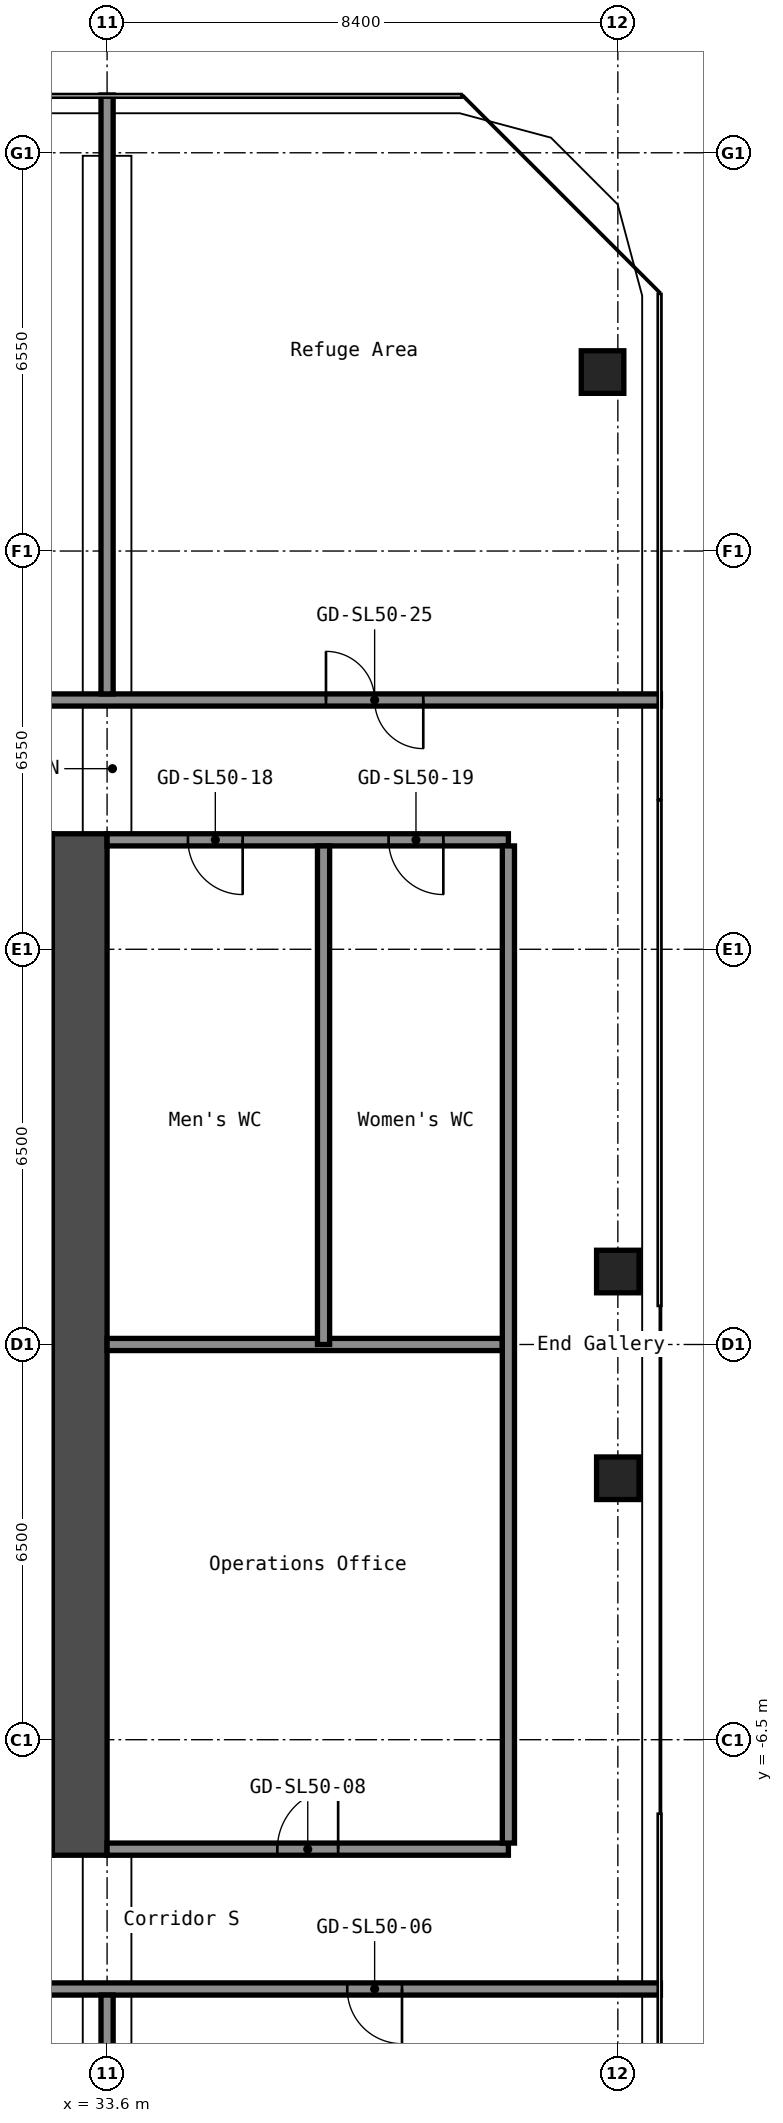
"""IFC4 building model, lengths in metres.
Left out: names, types, materials, properties, quantities, classifications, styles, units other than length and angle.
Written with IfcOpenShell. Run it as: python <this file> out.ifc"""

import sys

from ifc_helpers import new_model, si_unit, direction, frame, frame_2d, origin, origin_2d, place, context, subcontext, project, spatial, rectangle, hollow_rectangle, extrude, element, fill, save


model = new_model("IFC4")
c1 = context("Model", 3, precision=1e-05, world=origin(), true_north=direction((0.0, 1.0)))
c2 = subcontext(c1, "Body", "Model", "MODEL_VIEW")
j1 = project(units=[si_unit("LENGTHUNIT", "METRE"), si_unit("PLANEANGLEUNIT", "RADIAN")], contexts=[c1])
p1 = place(None, origin())
s1 = spatial("IfcSite", under=j1, at=p1, CompositionType="ELEMENT")
p2 = place(p1, origin())
s2 = spatial("IfcBuilding", under=s1, at=p2, CompositionType="ELEMENT")
p3 = place(p2, frame((0.0, 0.0, 175.8)))
s3 = spatial("IfcBuildingStorey", under=s2, at=p3, CompositionType="ELEMENT", Elevation=175.8)
for number, where, z_axis, x_axis in (
    (1, (42.0, -2.2, 0.0), (0.0, 0.0, 1.0), (1.0, 0.0, 0.0)),
    (2, (42.0, 1.2, 0.0), (0.0, 0.0, 1.0), (1.0, 0.0, 0.0)),
    (3, (41.749, 15.994, 0.0), (0.0, 0.0, 1.0), (1.0, 0.0, 0.0)),
):
    element("IfcColumn", number, at=place(p3, frame(where, z_axis=z_axis, x_axis=x_axis)), inside=s3, PredefinedType="COLUMN", context=c2, shape_type="SweptSolid", body=[
        extrude(hollow_rectangle(XDim=0.7, YDim=0.7, WallThickness=0.028, at=origin_2d()), origin(), (0.0, 0.0, 1.0), 4.1),
    ])
p4 = place(p3, frame((33.15, -8.4, 0.0), z_axis=(0.0, 0.0, 1.0), x_axis=(0.0, 1.0, 0.0)))
e4 = element("IfcWall", 4, at=p4, inside=s3, PredefinedType="SHEAR", context=c2, shape_type="SweptSolid", body=[
    extrude(rectangle(XDim=16.8, YDim=0.9, at=frame_2d((8.4, 0.0))), origin(), (0.0, 0.0, 1.0), 4.1),
])
p5 = place(p3, frame((16.8, -10.6, 0.0), z_axis=(0.0, 0.0, 1.0), x_axis=(1.0, 0.0, 0.0)))
e5 = element("IfcWall", 5, at=p5, inside=s3, PredefinedType="PARTITIONING", context=c2, shape_type="SweptSolid", body=[
    extrude(rectangle(XDim=25.9, YDim=0.2, at=frame_2d((12.95, 0.0))), origin(), (0.0, 0.0, 1.0), 4.1),
])
p6 = place(p5, frame((3.75, 0.0, 0.0)))
e6 = element("IfcOpeningElement", 6, at=p6, cuts=e5, PredefinedType="OPENING", context=c2, shape_type="SweptSolid", body=[
    extrude(rectangle(XDim=0.9, YDim=2.1, at=frame_2d((0.45, 1.05))), frame((0.0, 0.11, 0.0), z_axis=(0.0, -1.0, 0.0), x_axis=(1.0, 0.0, 0.0)), (0.0, 0.0, 1.0), 0.22),
])
p7 = place(p5, frame((11.8, 0.0, 0.0)))
e7 = element("IfcOpeningElement", 7, at=p7, cuts=e5, PredefinedType="OPENING", context=c2, shape_type="SweptSolid", body=[
    extrude(rectangle(XDim=1.6, YDim=2.1, at=frame_2d((0.8, 1.05))), frame((0.0, 0.11, 0.0), z_axis=(0.0, -1.0, 0.0), x_axis=(1.0, 0.0, 0.0)), (0.0, 0.0, 1.0), 0.22),
])
p8 = place(p5, frame((20.75, 0.0, 0.0)))
e8 = element("IfcOpeningElement", 8, at=p8, cuts=e5, PredefinedType="OPENING", context=c2, shape_type="SweptSolid", body=[
    extrude(rectangle(XDim=0.9, YDim=2.1, at=frame_2d((0.45, 1.05))), frame((0.0, 0.11, 0.0), z_axis=(0.0, -1.0, 0.0), x_axis=(1.0, 0.0, 0.0)), (0.0, 0.0, 1.0), 0.22),
])
p9 = place(p3, frame((33.6, -8.3, 0.0), z_axis=(0.0, 0.0, 1.0), x_axis=(1.0, 0.0, 0.0)))
e9 = element("IfcWall", 9, at=p9, inside=s3, PredefinedType="PARTITIONING", context=c2, shape_type="SweptSolid", body=[
    extrude(rectangle(XDim=6.6, YDim=0.2, at=frame_2d((3.3, 0.0))), origin(), (0.0, 0.0, 1.0), 4.1),
])
p10 = place(p9, frame((2.8, 0.0, 0.0)))
e10 = element("IfcOpeningElement", 10, at=p10, cuts=e9, PredefinedType="OPENING", context=c2, shape_type="SweptSolid", body=[
    extrude(rectangle(XDim=1.0, YDim=2.1, at=frame_2d((0.5, 1.05))), frame((0.0, 0.11, 0.0), z_axis=(0.0, -1.0, 0.0), x_axis=(1.0, 0.0, 0.0)), (0.0, 0.0, 1.0), 0.22),
])
p11 = place(p3, frame((33.6, 0.0, 0.0), z_axis=(0.0, 0.0, 1.0), x_axis=(1.0, 0.0, 0.0)))
e11 = element("IfcWall", 11, at=p11, inside=s3, PredefinedType="PARTITIONING", context=c2, shape_type="SweptSolid", body=[
    extrude(rectangle(XDim=6.5, YDim=0.2, at=frame_2d((3.25, 0.0))), origin(), (0.0, 0.0, 1.0), 4.1),
])
p12 = place(p3, frame((33.6, 8.3, 0.0), z_axis=(0.0, 0.0, 1.0), x_axis=(1.0, 0.0, 0.0)))
e12 = element("IfcWall", 12, at=p12, inside=s3, PredefinedType="PARTITIONING", context=c2, shape_type="SweptSolid", body=[
    extrude(rectangle(XDim=6.6, YDim=0.2, at=frame_2d((3.3, 0.0))), origin(), (0.0, 0.0, 1.0), 4.1),
])
p13 = place(p12, frame((1.33, 0.0, 0.0)))
e13 = element("IfcOpeningElement", 13, at=p13, cuts=e12, PredefinedType="OPENING", context=c2, shape_type="SweptSolid", body=[
    extrude(rectangle(XDim=0.9, YDim=2.1, at=frame_2d((0.45, 1.05))), frame((0.0, 0.11, 0.0), z_axis=(0.0, -1.0, 0.0), x_axis=(1.0, 0.0, 0.0)), (0.0, 0.0, 1.0), 0.22),
])
p14 = place(p12, frame((4.63, 0.0, 0.0)))
e14 = element("IfcOpeningElement", 14, at=p14, cuts=e12, PredefinedType="OPENING", context=c2, shape_type="SweptSolid", body=[
    extrude(rectangle(XDim=0.9, YDim=2.1, at=frame_2d((0.45, 1.05))), frame((0.0, 0.11, 0.0), z_axis=(0.0, -1.0, 0.0), x_axis=(1.0, 0.0, 0.0)), (0.0, 0.0, 1.0), 0.22),
])
p15 = place(p3, frame((16.8, 10.6, 0.0), z_axis=(0.0, 0.0, 1.0), x_axis=(1.0, 0.0, 0.0)))
e15 = element("IfcWall", 15, at=p15, inside=s3, PredefinedType="PARTITIONING", context=c2, shape_type="SweptSolid", body=[
    extrude(rectangle(XDim=25.9, YDim=0.2, at=frame_2d((12.95, 0.0))), origin(), (0.0, 0.0, 1.0), 4.1),
])
p16 = place(p15, frame((3.4, 0.0, 0.0)))
e16 = element("IfcOpeningElement", 16, at=p16, cuts=e15, PredefinedType="OPENING", context=c2, shape_type="SweptSolid", body=[
    extrude(rectangle(XDim=1.6, YDim=2.1, at=frame_2d((0.8, 1.05))), frame((0.0, 0.11, 0.0), z_axis=(0.0, -1.0, 0.0), x_axis=(1.0, 0.0, 0.0)), (0.0, 0.0, 1.0), 0.22),
])
p17 = place(p15, frame((12.15, 0.0, 0.0)))
e17 = element("IfcOpeningElement", 17, at=p17, cuts=e15, PredefinedType="OPENING", context=c2, shape_type="SweptSolid", body=[
    extrude(rectangle(XDim=0.9, YDim=2.1, at=frame_2d((0.45, 1.05))), frame((0.0, 0.11, 0.0), z_axis=(0.0, -1.0, 0.0), x_axis=(1.0, 0.0, 0.0)), (0.0, 0.0, 1.0), 0.22),
])
p18 = place(p15, frame((20.4, 0.0, 0.0)))
e18 = element("IfcOpeningElement", 18, at=p18, cuts=e15, PredefinedType="OPENING", context=c2, shape_type="SweptSolid", body=[
    extrude(rectangle(XDim=1.6, YDim=2.1, at=frame_2d((0.8, 1.05))), frame((0.0, 0.11, 0.0), z_axis=(0.0, -1.0, 0.0), x_axis=(1.0, 0.0, 0.0)), (0.0, 0.0, 1.0), 0.22),
])
p19 = place(p3, frame((33.6, -19.3, 0.0), z_axis=(0.0, 0.0, 1.0), x_axis=(0.0, 1.0, 0.0)))
e19 = element("IfcWall", 19, at=p19, inside=s3, PredefinedType="PARTITIONING", context=c2, shape_type="SweptSolid", body=[
    extrude(rectangle(XDim=8.6, YDim=0.2, at=frame_2d((4.3, 0.0))), origin(), (0.0, 0.0, 1.0), 4.1),
])
p20 = place(p3, frame((33.6, 10.7, 0.0), z_axis=(0.0, 0.0, 1.0), x_axis=(0.0, 1.0, 0.0)))
e20 = element("IfcWall", 20, at=p20, inside=s3, PredefinedType="PARTITIONING", context=c2, shape_type="SweptSolid", body=[
    extrude(rectangle(XDim=9.85, YDim=0.2, at=frame_2d((4.925, 0.0))), origin(), (0.0, 0.0, 1.0), 4.1),
])
p21 = place(p3, frame((37.16, 0.0, 0.0), z_axis=(0.0, 0.0, 1.0), x_axis=(0.0, 1.0, 0.0)))
e21 = element("IfcWall", 21, at=p21, inside=s3, PredefinedType="PARTITIONING", context=c2, shape_type="SweptSolid", body=[
    extrude(rectangle(XDim=8.2, YDim=0.2, at=frame_2d((4.1, 0.0))), origin(), (0.0, 0.0, 1.0), 4.1),
])
p22 = place(p3, frame((40.2, -8.2, 0.0), z_axis=(0.0, 0.0, 1.0), x_axis=(0.0, 1.0, 0.0)))
e22 = element("IfcWall", 22, at=p22, inside=s3, PredefinedType="PARTITIONING", context=c2, shape_type="SweptSolid", body=[
    extrude(rectangle(XDim=16.4, YDim=0.2, at=frame_2d((8.2, 0.0))), origin(), (0.0, 0.0, 1.0), 4.1),
])
p23 = place(p8, origin())
e23 = element("IfcDoor", 23, at=p23, inside=s3, OperationType="SINGLE_SWING_RIGHT", PredefinedType="DOOR", context=c2, shape_type="SweptSolid", body=[
    extrude(rectangle(XDim=0.9, YDim=2.1, at=frame_2d((0.45, 1.05))), frame((0.0, 0.025, 0.0), z_axis=(0.0, -1.0, 0.0), x_axis=(1.0, 0.0, 0.0)), (0.0, 0.0, 1.0), 0.05),
])
fill(e8, e23)
p24 = place(p10, origin())
e24 = element("IfcDoor", 24, at=p24, inside=s3, OperationType="SINGLE_SWING_LEFT", PredefinedType="DOOR", context=c2, shape_type="SweptSolid", body=[
    extrude(rectangle(XDim=1.0, YDim=2.1, at=frame_2d((0.5, 1.05))), frame((0.0, 0.025, 0.0), z_axis=(0.0, -1.0, 0.0), x_axis=(1.0, 0.0, 0.0)), (0.0, 0.0, 1.0), 0.05),
])
fill(e10, e24)
p25 = place(p13, origin())
e25 = element("IfcDoor", 25, at=p25, inside=s3, OperationType="SINGLE_SWING_RIGHT", PredefinedType="DOOR", context=c2, shape_type="SweptSolid", body=[
    extrude(rectangle(XDim=0.9, YDim=2.1, at=frame_2d((0.45, 1.05))), frame((0.0, 0.025, 0.0), z_axis=(0.0, -1.0, 0.0), x_axis=(1.0, 0.0, 0.0)), (0.0, 0.0, 1.0), 0.05),
])
fill(e13, e25)
p26 = place(p14, origin())
e26 = element("IfcDoor", 26, at=p26, inside=s3, OperationType="SINGLE_SWING_RIGHT", PredefinedType="DOOR", context=c2, shape_type="SweptSolid", body=[
    extrude(rectangle(XDim=0.9, YDim=2.1, at=frame_2d((0.45, 1.05))), frame((0.0, 0.025, 0.0), z_axis=(0.0, -1.0, 0.0), x_axis=(1.0, 0.0, 0.0)), (0.0, 0.0, 1.0), 0.05),
])
fill(e14, e26)
p27 = place(p18, origin())
e27 = element("IfcDoor", 27, at=p27, inside=s3, OperationType="DOUBLE_DOOR_SINGLE_SWING", PredefinedType="DOOR", context=c2, shape_type="SweptSolid", body=[
    extrude(rectangle(XDim=1.6, YDim=2.1, at=frame_2d((0.8, 1.05))), frame((0.0, 0.025, 0.0), z_axis=(0.0, -1.0, 0.0), x_axis=(1.0, 0.0, 0.0)), (0.0, 0.0, 1.0), 0.05),
])
fill(e18, e27)
save(model, sys.argv[1])
